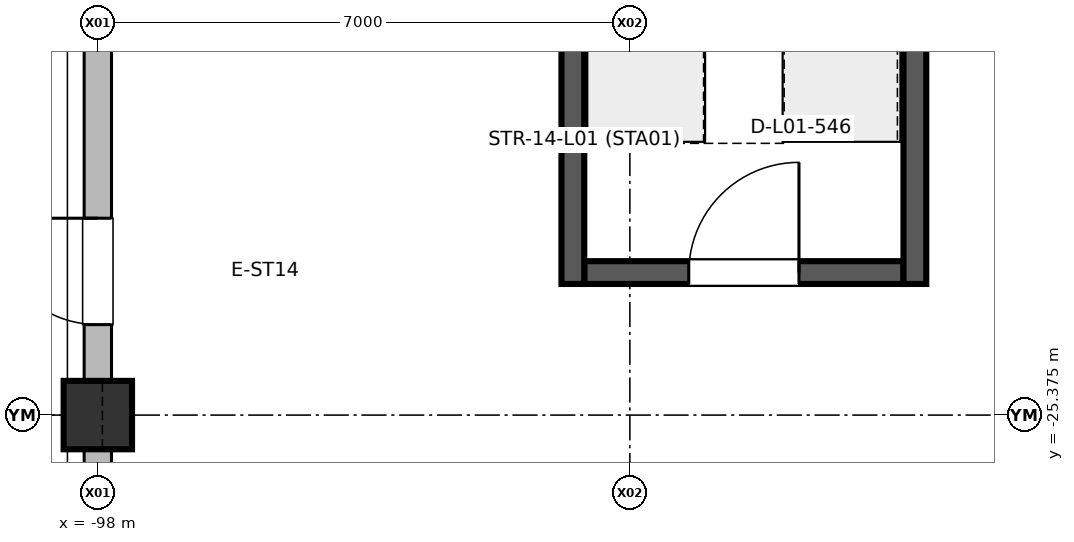
"""IFC4 building model, lengths in metres.
Left out: names, types, materials, properties, quantities, classifications, styles, units other than length and angle.
Written with IfcOpenShell. Run it as: python <this file> out.ifc"""

import sys

from ifc_helpers import new_model, si_unit, direction, frame, frame_2d, origin, origin_2d, place, context, subcontext, project, spatial, rectangle, extrude, element, fill, save


model = new_model("IFC4")
c1 = context("Model", 3, precision=1e-05, world=origin(), true_north=direction((0.0, 1.0)))
c2 = subcontext(c1, "Body", "Model", "MODEL_VIEW")
j1 = project(units=[si_unit("LENGTHUNIT", "METRE"), si_unit("PLANEANGLEUNIT", "RADIAN")], contexts=[c1])
p1 = place(None, origin())
s1 = spatial("IfcSite", under=j1, at=p1, CompositionType="ELEMENT")
p2 = place(p1, origin())
s2 = spatial("IfcBuilding", under=s1, at=p2, CompositionType="ELEMENT")
p3 = place(p2, origin())
s3 = spatial("IfcBuildingStorey", under=s2, at=p3, CompositionType="ELEMENT", Elevation=0.0)
p4 = place(p3, frame((-98.0, -25.375, 0.0), z_axis=(0.0, 0.0, 1.0), x_axis=(1.0, 0.0, 0.0)))
e1 = element("IfcColumn", 1, at=p4, inside=s3, PredefinedType="COLUMN", context=c2, shape_type="SweptSolid", body=[
    extrude(rectangle(XDim=0.9, YDim=0.9, at=origin_2d()), origin(), (0.0, 0.0, 1.0), 5.998),
])
p5 = place(p3, frame((-98.0, -38.685, 0.0), z_axis=(0.0, 0.0, 1.0), x_axis=(0.0, 1.0, 0.0)))
e2 = element("IfcWall", 2, at=p5, inside=s3, PredefinedType="SOLIDWALL", context=c2, shape_type="SweptSolid", body=[
    extrude(rectangle(XDim=12.87, YDim=0.36, at=frame_2d((6.435, 0.0))), origin(), (0.0, 0.0, 1.0), 3.955),
])
p6 = place(p5, frame((4.835, 0.0, 0.0)))
e3 = element("IfcOpeningElement", 3, at=p6, cuts=e2, PredefinedType="OPENING", context=c2, shape_type="SweptSolid", body=[
    extrude(rectangle(XDim=3.2, YDim=2.7, at=frame_2d((1.6, 1.35))), frame((0.0, 0.19, 0.0), z_axis=(0.0, -1.0, 0.0), x_axis=(1.0, 0.0, 0.0)), (0.0, 0.0, 1.0), 0.38),
])
p7 = place(p5, frame((0.75, 0.0, 1.0)))
e4 = element("IfcOpeningElement", 4, at=p7, cuts=e2, PredefinedType="OPENING", context=c2, shape_type="SweptSolid", body=[
    extrude(rectangle(XDim=1.5, YDim=1.9, at=frame_2d((0.75, 0.95))), frame((0.0, 0.19, 0.0), z_axis=(0.0, -1.0, 0.0), x_axis=(1.0, 0.0, 0.0)), (0.0, 0.0, 1.0), 0.38),
])
p8 = place(p5, frame((10.62, 0.0, 1.0)))
e5 = element("IfcOpeningElement", 5, at=p8, cuts=e2, PredefinedType="OPENING", context=c2, shape_type="SweptSolid", body=[
    extrude(rectangle(XDim=1.5, YDim=1.9, at=frame_2d((0.75, 0.95))), frame((0.0, 0.19, 0.0), z_axis=(0.0, -1.0, 0.0), x_axis=(1.0, 0.0, 0.0)), (0.0, 0.0, 1.0), 0.38),
])
p9 = place(p3, frame((-98.0, -24.935, 0.0), z_axis=(0.0, 0.0, 1.0), x_axis=(0.0, 1.0, 0.0)))
e6 = element("IfcWall", 6, at=p9, inside=s3, PredefinedType="SOLIDWALL", context=c2, shape_type="SweptSolid", body=[
    extrude(rectangle(XDim=12.87, YDim=0.36, at=frame_2d((6.435, 0.0))), origin(), (0.0, 0.0, 1.0), 4.655),
])
p10 = place(p9, frame((5.235, 0.0, 0.0)))
e7 = element("IfcOpeningElement", 7, at=p10, cuts=e6, PredefinedType="OPENING", context=c2, shape_type="SweptSolid", body=[
    extrude(rectangle(XDim=2.4, YDim=2.5, at=frame_2d((1.2, 1.25))), frame((0.0, 0.19, 0.0), z_axis=(0.0, -1.0, 0.0), x_axis=(1.0, 0.0, 0.0)), (0.0, 0.0, 1.0), 0.38),
])
p11 = place(p9, frame((0.75, 0.0, 0.0)))
e8 = element("IfcOpeningElement", 8, at=p11, cuts=e6, PredefinedType="OPENING", context=c2, shape_type="SweptSolid", body=[
    extrude(rectangle(XDim=1.4, YDim=2.2, at=frame_2d((0.7, 1.1))), frame((0.0, 0.19, 0.0), z_axis=(0.0, -1.0, 0.0), x_axis=(1.0, 0.0, 0.0)), (0.0, 0.0, 1.0), 0.38),
])
p12 = place(p9, frame((10.02, 0.0, 1.0)))
e9 = element("IfcOpeningElement", 9, at=p12, cuts=e6, PredefinedType="OPENING", context=c2, shape_type="SweptSolid", body=[
    extrude(rectangle(XDim=2.1, YDim=2.0, at=frame_2d((1.05, 1.0))), frame((0.0, 0.19, 0.0), z_axis=(0.0, -1.0, 0.0), x_axis=(1.0, 0.0, 0.0)), (0.0, 0.0, 1.0), 0.38),
])
p13 = place(p3, frame((-91.6, -23.5, 0.0), z_axis=(0.0, 0.0, 1.0), x_axis=(1.0, 0.0, 0.0)))
e10 = element("IfcWall", 10, at=p13, inside=s3, PredefinedType="SHEAR", context=c2, shape_type="SweptSolid", body=[
    extrude(rectangle(XDim=4.2, YDim=0.3, at=frame_2d((2.1, 0.0))), origin(), (0.0, 0.0, 1.0), 5.78),
])
p14 = place(p13, frame((1.375, 0.0, 0.0)))
e11 = element("IfcOpeningElement", 11, at=p14, cuts=e10, PredefinedType="OPENING", context=c2, shape_type="SweptSolid", body=[
    extrude(rectangle(XDim=1.45, YDim=2.2, at=frame_2d((0.725, 1.1))), frame((0.0, 0.16, 0.0), z_axis=(0.0, -1.0, 0.0), x_axis=(1.0, 0.0, 0.0)), (0.0, 0.0, 1.0), 0.32),
])
for number, where, z_axis, x_axis in (
    (12, (-91.75, -23.65, 0.0), (0.0, 0.0, 1.0), (0.0, 1.0, 0.0)),
    (13, (-87.25, -23.65, 0.0), (0.0, 0.0, 1.0), (0.0, 1.0, 0.0)),
):
    element("IfcWall", number, at=place(p3, frame(where, z_axis=z_axis, x_axis=x_axis)), inside=s3, PredefinedType="SHEAR", context=c2, shape_type="SweptSolid", body=[
        extrude(rectangle(XDim=8.45, YDim=0.3, at=frame_2d((4.225, 0.0))), origin(), (0.0, 0.0, 1.0), 5.78),
    ])
p15 = place(p11, origin())
e14 = element("IfcDoor", 14, at=p15, inside=s3, OperationType="SINGLE_SWING_RIGHT", PredefinedType="DOOR", context=c2, shape_type="SweptSolid", body=[
    extrude(rectangle(XDim=1.4, YDim=2.2, at=frame_2d((0.7, 1.1))), frame((0.0, 0.025, 0.0), z_axis=(0.0, -1.0, 0.0), x_axis=(1.0, 0.0, 0.0)), (0.0, 0.0, 1.0), 0.05),
])
fill(e8, e14)
p16 = place(p14, origin())
e15 = element("IfcDoor", 15, at=p16, inside=s3, OperationType="SINGLE_SWING_RIGHT", PredefinedType="DOOR", context=c2, shape_type="SweptSolid", body=[
    extrude(rectangle(XDim=1.45, YDim=2.2, at=frame_2d((0.725, 1.1))), frame((0.0, 0.025, 0.0), z_axis=(0.0, -1.0, 0.0), x_axis=(1.0, 0.0, 0.0)), (0.0, 0.0, 1.0), 0.05),
])
fill(e11, e15)
save(model, sys.argv[1])
